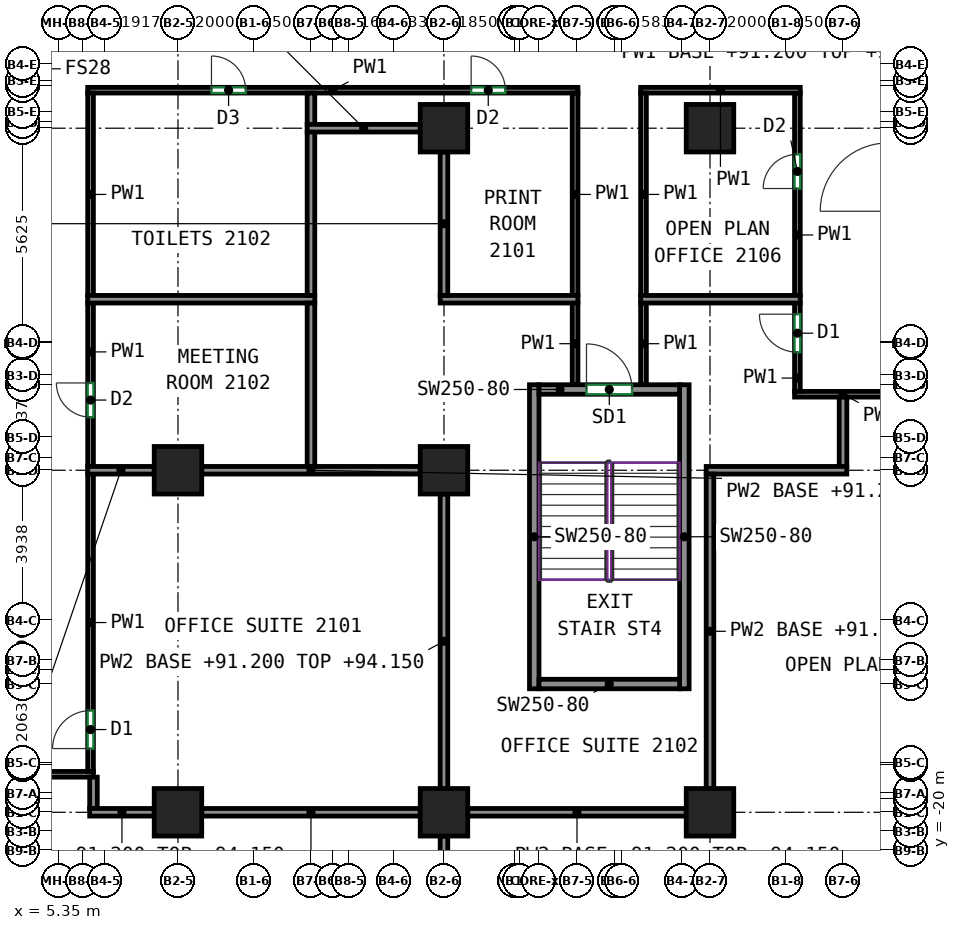
"""IFC4 building model, lengths in metres.
Left out: names, types, materials, properties, quantities, classifications, styles, units other than length and angle.
Written with IfcOpenShell. Run it as: python <this file> out.ifc"""

import sys

from ifc_helpers import new_model, si_unit, direction, frame, frame_2d, origin, origin_2d, place, context, subcontext, project, spatial, rectangle, extrude, source, transform, mapped, element, fill, save


model = new_model("IFC4")
c1 = context("Model", 3, precision=1e-05, world=origin(), true_north=direction((0.0, 1.0)))
c2 = subcontext(c1, "Body", "Model", "MODEL_VIEW")
j1 = project(units=[si_unit("LENGTHUNIT", "METRE"), si_unit("PLANEANGLEUNIT", "RADIAN")], contexts=[c1])
p1 = place(None, origin())
s1 = spatial("IfcSite", under=j1, at=p1, CompositionType="ELEMENT")
p2 = place(p1, origin())
s2 = spatial("IfcBuilding", under=s1, at=p2, CompositionType="ELEMENT")
p3 = place(p2, frame((0.0, 0.0, 91.2)))
s3 = spatial("IfcBuildingStorey", under=s2, at=p3, CompositionType="ELEMENT", Elevation=91.2)
m1 = source(origin(), c2, "Body", "SweptSolid", [
    extrude(rectangle(XDim=1.25, YDim=1.25, at=origin_2d()), origin(), (0.0, 0.0, 1.0), 3.6),
])
for number, where, z_axis, x_axis in (
    (1, (8.5, -19.0, 0.0), (0.0, 0.0, 1.0), (1.0, 0.0, 0.0)),
    (2, (8.5, -10.0, 0.0), (0.0, 0.0, 1.0), (1.0, 0.0, 0.0)),
    (3, (15.5, -19.0, 0.0), (0.0, 0.0, 1.0), (1.0, 0.0, 0.0)),
    (4, (15.5, -10.0, 0.0), (0.0, 0.0, 1.0), (1.0, 0.0, 0.0)),
    (5, (15.5, -1.0, 0.0), (0.0, 0.0, 1.0), (1.0, 0.0, 0.0)),
    (6, (22.5, -19.0, 0.0), (0.0, 0.0, 1.0), (1.0, 0.0, 0.0)),
    (7, (22.5, -1.0, 0.0), (0.0, 0.0, 1.0), (1.0, 0.0, 0.0)),
):
    element("IfcColumn", number, at=place(p3, frame(where, z_axis=z_axis, x_axis=x_axis)), inside=s3, PredefinedType="COLUMN", context=c2, shape_type="MappedRepresentation", body=[
        mapped(m1, transform((0.0, 0.0, 0.0))),
    ])
m2 = source(origin(), c2, "Body", "SweptSolid", [
    extrude(rectangle(XDim=8.0, YDim=0.25, at=frame_2d((4.0, 0.0))), origin(), (0.0, 0.0, 1.0), 3.6),
])
for number, where, z_axis, x_axis in (
    (8, (17.875, -15.75, 0.0), (0.0, 0.0, 1.0), (0.0, 1.0, 0.0)),
    (9, (21.825, -15.75, 0.0), (0.0, 0.0, 1.0), (0.0, 1.0, 0.0)),
):
    element("IfcWall", number, at=place(p3, frame(where, z_axis=z_axis, x_axis=x_axis)), inside=s3, PredefinedType="SHEAR", context=c2, shape_type="MappedRepresentation", body=[
        mapped(m2, transform((0.0, 0.0, 0.0))),
    ])
m3 = source(origin(), c2, "Body", "SweptSolid", [
    extrude(rectangle(XDim=3.7, YDim=0.25, at=frame_2d((1.85, 0.0))), origin(), (0.0, 0.0, 1.0), 3.6),
])
p4 = place(p3, frame((18.0, -15.625, 0.0), z_axis=(0.0, 0.0, 1.0), x_axis=(1.0, 0.0, 0.0)))
e10 = element("IfcWall", 10, at=p4, inside=s3, PredefinedType="SHEAR", context=c2, shape_type="MappedRepresentation", body=[
    mapped(m3, transform((0.0, 0.0, 0.0))),
])
p5 = place(p3, frame((18.0, -7.875, 0.0), z_axis=(0.0, 0.0, 1.0), x_axis=(1.0, 0.0, 0.0)))
e11 = element("IfcWall", 11, at=p5, inside=s3, PredefinedType="SHEAR", context=c2, shape_type="MappedRepresentation", body=[
    mapped(m3, transform((0.0, 0.0, 0.0))),
])
p6 = place(p5, frame((1.25, 0.0, 0.0)))
e12 = element("IfcOpeningElement", 12, at=p6, cuts=e11, PredefinedType="OPENING", context=c2, shape_type="SweptSolid", body=[
    extrude(rectangle(XDim=1.2, YDim=2.1, at=frame_2d((0.6, 1.05))), frame((0.0, 0.135, 0.0), z_axis=(0.0, -1.0, 0.0), x_axis=(1.0, 0.0, 0.0)), (0.0, 0.0, 1.0), 0.27),
])
p7 = place(p3, frame((3.802, -18.0, 0.0), z_axis=(0.0, 0.0, 1.0), x_axis=(1.0, 0.0, 0.0)))
e13 = element("IfcWall", 13, at=p7, inside=s3, PredefinedType="PARTITIONING", context=c2, shape_type="SweptSolid", body=[
    extrude(rectangle(XDim=2.473, YDim=0.15, at=frame_2d((1.236, 0.0))), origin(), (0.0, 0.0, 1.0), 3.6),
])
p8 = place(p3, frame((6.2, -17.925, 0.0), z_axis=(0.0, 0.0, 1.0), x_axis=(0.0, 1.0, 0.0)))
e14 = element("IfcWall", 14, at=p8, inside=s3, PredefinedType="PARTITIONING", context=c2, shape_type="SweptSolid", body=[
    extrude(rectangle(XDim=7.835, YDim=0.15, at=frame_2d((3.917, 0.0))), origin(), (0.0, 0.0, 1.0), 3.6),
])
p9 = place(p8, frame((0.602, 0.0, 0.0)))
e15 = element("IfcOpeningElement", 15, at=p9, cuts=e14, PredefinedType="OPENING", context=c2, shape_type="SweptSolid", body=[
    extrude(rectangle(XDim=1.0, YDim=2.1, at=frame_2d((0.5, 1.05))), frame((0.0, 0.085, 0.0), z_axis=(0.0, -1.0, 0.0), x_axis=(1.0, 0.0, 0.0)), (0.0, 0.0, 1.0), 0.17),
])
p10 = place(p3, frame((6.2, -9.91, 0.0), z_axis=(0.0, 0.0, 1.0), x_axis=(0.0, 1.0, 0.0)))
e16 = element("IfcWall", 16, at=p10, inside=s3, PredefinedType="PARTITIONING", context=c2, shape_type="SweptSolid", body=[
    extrude(rectangle(XDim=4.32, YDim=0.15, at=frame_2d((2.16, 0.0))), origin(), (0.0, 0.0, 1.0), 3.6),
])
p11 = place(p10, frame((1.307, 0.0, 0.0)))
e17 = element("IfcOpeningElement", 17, at=p11, cuts=e16, PredefinedType="OPENING", context=c2, shape_type="SweptSolid", body=[
    extrude(rectangle(XDim=0.9, YDim=2.1, at=frame_2d((0.45, 1.05))), frame((0.0, 0.085, 0.0), z_axis=(0.0, -1.0, 0.0), x_axis=(1.0, 0.0, 0.0)), (0.0, 0.0, 1.0), 0.17),
])
p12 = place(p3, frame((6.125, 0.0, 0.0), z_axis=(0.0, 0.0, 1.0), x_axis=(1.0, 0.0, 0.0)))
e18 = element("IfcWall", 18, at=p12, inside=s3, PredefinedType="PARTITIONING", context=c2, shape_type="SweptSolid", body=[
    extrude(rectangle(XDim=12.9, YDim=0.15, at=frame_2d((6.45, 0.0))), origin(), (0.0, 0.0, 1.0), 3.6),
])
p13 = place(p12, frame((3.257, 0.0, 0.0)))
e19 = element("IfcOpeningElement", 19, at=p13, cuts=e18, PredefinedType="OPENING", context=c2, shape_type="SweptSolid", body=[
    extrude(rectangle(XDim=0.9, YDim=2.1, at=frame_2d((0.45, 1.05))), frame((0.0, 0.085, 0.0), z_axis=(0.0, -1.0, 0.0), x_axis=(1.0, 0.0, 0.0)), (0.0, 0.0, 1.0), 0.17),
])
p14 = place(p12, frame((10.09, 0.0, 0.0)))
e20 = element("IfcOpeningElement", 20, at=p14, cuts=e18, PredefinedType="OPENING", context=c2, shape_type="SweptSolid", body=[
    extrude(rectangle(XDim=0.9, YDim=2.1, at=frame_2d((0.45, 1.05))), frame((0.0, 0.085, 0.0), z_axis=(0.0, -1.0, 0.0), x_axis=(1.0, 0.0, 0.0)), (0.0, 0.0, 1.0), 0.17),
])
for number, where, z_axis, x_axis in (
    (21, (6.2, -5.41, 0.0), (0.0, 0.0, 1.0), (0.0, 1.0, 0.0)),
    (22, (18.95, -5.41, 0.0), (0.0, 0.0, 1.0), (0.0, 1.0, 0.0)),
):
    element("IfcWall", number, at=place(p3, frame(where, z_axis=z_axis, x_axis=x_axis)), inside=s3, PredefinedType="PARTITIONING", context=c2, shape_type="SweptSolid", body=[
        extrude(rectangle(XDim=5.335, YDim=0.15, at=frame_2d((2.667, 0.0))), origin(), (0.0, 0.0, 1.0), 3.6),
    ])
p15 = place(p3, frame((24.725, -8.0, 0.0), z_axis=(0.0, 0.0, 1.0), x_axis=(1.0, 0.0, 0.0)))
e23 = element("IfcWall", 23, at=p15, inside=s3, PredefinedType="PARTITIONING", context=c2, shape_type="SweptSolid", body=[
    extrude(rectangle(XDim=2.55, YDim=0.15, at=frame_2d((1.275, 0.0))), origin(), (0.0, 0.0, 1.0), 3.6),
])
p16 = place(p3, frame((24.8, -7.925, 0.0), z_axis=(0.0, 0.0, 1.0), x_axis=(0.0, 1.0, 0.0)))
e24 = element("IfcWall", 24, at=p16, inside=s3, PredefinedType="PARTITIONING", context=c2, shape_type="SweptSolid", body=[
    extrude(rectangle(XDim=2.335, YDim=0.15, at=frame_2d((1.167, 0.0))), origin(), (0.0, 0.0, 1.0), 3.6),
])
p17 = place(p16, frame((1.031, 0.0, 0.0)))
e25 = element("IfcOpeningElement", 25, at=p17, cuts=e24, PredefinedType="OPENING", context=c2, shape_type="SweptSolid", body=[
    extrude(rectangle(XDim=1.0, YDim=2.1, at=frame_2d((0.5, 1.05))), frame((0.0, 0.085, 0.0), z_axis=(0.0, -1.0, 0.0), x_axis=(1.0, 0.0, 0.0)), (0.0, 0.0, 1.0), 0.17),
])
for number, where, z_axis, x_axis in (
    (26, (20.75, -7.75, 0.0), (0.0, 0.0, 1.0), (0.0, 1.0, 0.0)),
    (27, (18.95, -7.75, 0.0), (0.0, 0.0, 1.0), (0.0, 1.0, 0.0)),
):
    element("IfcWall", number, at=place(p3, frame(where, z_axis=z_axis, x_axis=x_axis)), inside=s3, PredefinedType="PARTITIONING", context=c2, shape_type="SweptSolid", body=[
        extrude(rectangle(XDim=2.16, YDim=0.15, at=frame_2d((1.08, 0.0))), origin(), (0.0, 0.0, 1.0), 3.6),
    ])
p18 = place(p3, frame((24.8, -5.41, 0.0), z_axis=(0.0, 0.0, 1.0), x_axis=(0.0, 1.0, 0.0)))
e28 = element("IfcWall", 28, at=p18, inside=s3, PredefinedType="PARTITIONING", context=c2, shape_type="SweptSolid", body=[
    extrude(rectangle(XDim=5.335, YDim=0.15, at=frame_2d((2.667, 0.0))), origin(), (0.0, 0.0, 1.0), 3.6),
])
p19 = place(p18, frame((2.823, 0.0, 0.0)))
e29 = element("IfcOpeningElement", 29, at=p19, cuts=e28, PredefinedType="OPENING", context=c2, shape_type="SweptSolid", body=[
    extrude(rectangle(XDim=0.9, YDim=2.1, at=frame_2d((0.45, 1.05))), frame((0.0, 0.085, 0.0), z_axis=(0.0, -1.0, 0.0), x_axis=(1.0, 0.0, 0.0)), (0.0, 0.0, 1.0), 0.17),
])
p20 = place(p3, frame((20.675, 0.0, 0.0), z_axis=(0.0, 0.0, 1.0), x_axis=(1.0, 0.0, 0.0)))
e30 = element("IfcWall", 30, at=p20, inside=s3, PredefinedType="PARTITIONING", context=c2, shape_type="SweptSolid", body=[
    extrude(rectangle(XDim=4.2, YDim=0.15, at=frame_2d((2.1, 0.0))), origin(), (0.0, 0.0, 1.0), 3.6),
])
p21 = place(p3, frame((20.75, -5.41, 0.0), z_axis=(0.0, 0.0, 1.0), x_axis=(0.0, 1.0, 0.0)))
e31 = element("IfcWall", 31, at=p21, inside=s3, PredefinedType="PARTITIONING", context=c2, shape_type="SweptSolid", body=[
    extrude(rectangle(XDim=5.335, YDim=0.15, at=frame_2d((2.667, 0.0))), origin(), (0.0, 0.0, 1.0), 3.6),
])
p22 = place(p3, frame((6.277, -18.9, 0.0), z_axis=(0.0, 0.0, 1.0), x_axis=(0.0, 1.0, 0.0)))
e32 = element("IfcWall", 32, at=p22, inside=s3, PredefinedType="PARTITIONING", context=c2, shape_type="SweptSolid", body=[
    extrude(rectangle(XDim=0.825, YDim=0.2, at=frame_2d((0.413, 0.0))), origin(), (0.0, 0.0, 1.0), 3.6),
])
p23 = place(p3, frame((6.177, -19.0, 0.0), z_axis=(0.0, 0.0, 1.0), x_axis=(1.0, 0.0, 0.0)))
e33 = element("IfcWall", 33, at=p23, inside=s3, PredefinedType="PARTITIONING", context=c2, shape_type="SweptSolid", body=[
    extrude(rectangle(XDim=1.698, YDim=0.2, at=frame_2d((0.849, 0.0))), origin(), (0.0, 0.0, 1.0), 2.95),
])
p24 = place(p3, frame((9.125, -19.0, 0.0), z_axis=(0.0, 0.0, 1.0), x_axis=(1.0, 0.0, 0.0)))
e34 = element("IfcWall", 34, at=p24, inside=s3, PredefinedType="PARTITIONING", context=c2, shape_type="SweptSolid", body=[
    extrude(rectangle(XDim=5.75, YDim=0.2, at=frame_2d((2.875, 0.0))), origin(), (0.0, 0.0, 1.0), 2.95),
])
p25 = place(p3, frame((15.5, -27.1, 0.0), z_axis=(0.0, 0.0, 1.0), x_axis=(0.0, 1.0, 0.0)))
e35 = element("IfcWall", 35, at=p25, inside=s3, PredefinedType="PARTITIONING", context=c2, shape_type="SweptSolid", body=[
    extrude(rectangle(XDim=7.475, YDim=0.2, at=frame_2d((3.738, 0.0))), origin(), (0.0, 0.0, 1.0), 2.95),
])
p26 = place(p3, frame((9.125, -10.0, 0.0), z_axis=(0.0, 0.0, 1.0), x_axis=(1.0, 0.0, 0.0)))
e36 = element("IfcWall", 36, at=p26, inside=s3, PredefinedType="PARTITIONING", context=c2, shape_type="SweptSolid", body=[
    extrude(rectangle(XDim=5.75, YDim=0.2, at=frame_2d((2.875, 0.0))), origin(), (0.0, 0.0, 1.0), 2.95),
])
p27 = place(p3, frame((6.126, -10.0, 0.0), z_axis=(0.0, 0.0, 1.0), x_axis=(1.0, 0.0, 0.0)))
e37 = element("IfcWall", 37, at=p27, inside=s3, PredefinedType="PARTITIONING", context=c2, shape_type="SweptSolid", body=[
    extrude(rectangle(XDim=1.749, YDim=0.2, at=frame_2d((0.875, 0.0))), origin(), (0.0, 0.0, 1.0), 2.95),
])
p28 = place(p3, frame((15.5, -18.375, 0.0), z_axis=(0.0, 0.0, 1.0), x_axis=(0.0, 1.0, 0.0)))
e38 = element("IfcWall", 38, at=p28, inside=s3, PredefinedType="PARTITIONING", context=c2, shape_type="SweptSolid", body=[
    extrude(rectangle(XDim=7.75, YDim=0.2, at=frame_2d((3.875, 0.0))), origin(), (0.0, 0.0, 1.0), 2.95),
])
p29 = place(p3, frame((6.126, -5.5, 0.0), z_axis=(0.0, 0.0, 1.0), x_axis=(1.0, 0.0, 0.0)))
e39 = element("IfcWall", 39, at=p29, inside=s3, PredefinedType="PARTITIONING", context=c2, shape_type="SweptSolid", body=[
    extrude(rectangle(XDim=5.974, YDim=0.2, at=frame_2d((2.987, 0.0))), origin(), (0.0, 0.0, 1.0), 3.6),
])
p30 = place(p3, frame((12.0, -9.9, 0.0), z_axis=(0.0, 0.0, 1.0), x_axis=(0.0, 1.0, 0.0)))
e40 = element("IfcWall", 40, at=p30, inside=s3, PredefinedType="PARTITIONING", context=c2, shape_type="SweptSolid", body=[
    extrude(rectangle(XDim=4.3, YDim=0.2, at=frame_2d((2.15, 0.0))), origin(), (0.0, 0.0, 1.0), 3.6),
])
p31 = place(p3, frame((12.0, -0.91, 0.0), z_axis=(0.0, 0.0, 1.0), x_axis=(0.0, 1.0, 0.0)))
e41 = element("IfcWall", 41, at=p31, inside=s3, PredefinedType="PARTITIONING", context=c2, shape_type="SweptSolid", body=[
    extrude(rectangle(XDim=0.834, YDim=0.2, at=frame_2d((0.417, 0.0))), origin(), (0.0, 0.0, 1.0), 3.6),
])
p32 = place(p3, frame((12.0, -5.4, 0.0), z_axis=(0.0, 0.0, 1.0), x_axis=(0.0, 1.0, 0.0)))
e42 = element("IfcWall", 42, at=p32, inside=s3, PredefinedType="PARTITIONING", context=c2, shape_type="SweptSolid", body=[
    extrude(rectangle(XDim=4.31, YDim=0.2, at=frame_2d((2.155, 0.0))), origin(), (0.0, 0.0, 1.0), 3.6),
])
p33 = place(p3, frame((15.4, -5.5, 0.0), z_axis=(0.0, 0.0, 1.0), x_axis=(1.0, 0.0, 0.0)))
e43 = element("IfcWall", 43, at=p33, inside=s3, PredefinedType="PARTITIONING", context=c2, shape_type="SweptSolid", body=[
    extrude(rectangle(XDim=3.624, YDim=0.2, at=frame_2d((1.812, 0.0))), origin(), (0.0, 0.0, 1.0), 3.6),
])
p34 = place(p3, frame((15.5, -5.4, 0.0), z_axis=(0.0, 0.0, 1.0), x_axis=(0.0, 1.0, 0.0)))
e44 = element("IfcWall", 44, at=p34, inside=s3, PredefinedType="PARTITIONING", context=c2, shape_type="SweptSolid", body=[
    extrude(rectangle(XDim=3.775, YDim=0.2, at=frame_2d((1.887, 0.0))), origin(), (0.0, 0.0, 1.0), 2.95),
])
p35 = place(p3, frame((11.9, -1.0, 0.0), z_axis=(0.0, 0.0, 1.0), x_axis=(1.0, 0.0, 0.0)))
e45 = element("IfcWall", 45, at=p35, inside=s3, PredefinedType="PARTITIONING", context=c2, shape_type="SweptSolid", body=[
    extrude(rectangle(XDim=2.975, YDim=0.2, at=frame_2d((1.488, 0.0))), origin(), (0.0, 0.0, 1.0), 2.95),
])
p36 = place(p3, frame((20.676, -5.5, 0.0), z_axis=(0.0, 0.0, 1.0), x_axis=(1.0, 0.0, 0.0)))
e46 = element("IfcWall", 46, at=p36, inside=s3, PredefinedType="PARTITIONING", context=c2, shape_type="SweptSolid", body=[
    extrude(rectangle(XDim=4.198, YDim=0.2, at=frame_2d((2.099, 0.0))), origin(), (0.0, 0.0, 1.0), 3.6),
])
p37 = place(p3, frame((26.0, -9.9, 0.0), z_axis=(0.0, 0.0, 1.0), x_axis=(0.0, 1.0, 0.0)))
e47 = element("IfcWall", 47, at=p37, inside=s3, PredefinedType="PARTITIONING", context=c2, shape_type="SweptSolid", body=[
    extrude(rectangle(XDim=1.824, YDim=0.2, at=frame_2d((0.912, 0.0))), origin(), (0.0, 0.0, 1.0), 3.6),
])
p38 = place(p3, frame((22.4, -10.0, 0.0), z_axis=(0.0, 0.0, 1.0), x_axis=(1.0, 0.0, 0.0)))
e48 = element("IfcWall", 48, at=p38, inside=s3, PredefinedType="PARTITIONING", context=c2, shape_type="SweptSolid", body=[
    extrude(rectangle(XDim=3.7, YDim=0.2, at=frame_2d((1.85, 0.0))), origin(), (0.0, 0.0, 1.0), 3.6),
])
p39 = place(p3, frame((22.5, -18.375, 0.0), z_axis=(0.0, 0.0, 1.0), x_axis=(0.0, 1.0, 0.0)))
e49 = element("IfcWall", 49, at=p39, inside=s3, PredefinedType="PARTITIONING", context=c2, shape_type="SweptSolid", body=[
    extrude(rectangle(XDim=8.275, YDim=0.2, at=frame_2d((4.137, 0.0))), origin(), (0.0, 0.0, 1.0), 2.95),
])
p40 = place(p3, frame((16.125, -19.0, 0.0), z_axis=(0.0, 0.0, 1.0), x_axis=(1.0, 0.0, 0.0)))
e50 = element("IfcWall", 50, at=p40, inside=s3, PredefinedType="PARTITIONING", context=c2, shape_type="SweptSolid", body=[
    extrude(rectangle(XDim=5.75, YDim=0.2, at=frame_2d((2.875, 0.0))), origin(), (0.0, 0.0, 1.0), 2.95),
])
p41 = place(p6, origin())
e51 = element("IfcDoor", 51, at=p41, inside=s3, OperationType="DOUBLE_DOOR_SINGLE_SWING", PredefinedType="DOOR", context=c2, shape_type="SweptSolid", body=[
    extrude(rectangle(XDim=1.2, YDim=2.1, at=frame_2d((0.6, 1.05))), frame((0.0, 0.025, 0.0), z_axis=(0.0, -1.0, 0.0), x_axis=(1.0, 0.0, 0.0)), (0.0, 0.0, 1.0), 0.05),
])
fill(e12, e51)
p42 = place(p9, origin())
e52 = element("IfcDoor", 52, at=p42, inside=s3, OperationType="SINGLE_SWING_LEFT", PredefinedType="DOOR", context=c2, shape_type="SweptSolid", body=[
    extrude(rectangle(XDim=1.0, YDim=2.1, at=frame_2d((0.5, 1.05))), frame((0.0, 0.025, 0.0), z_axis=(0.0, -1.0, 0.0), x_axis=(1.0, 0.0, 0.0)), (0.0, 0.0, 1.0), 0.05),
])
fill(e15, e52)
p43 = place(p11, origin())
e53 = element("IfcDoor", 53, at=p43, inside=s3, OperationType="SINGLE_SWING_RIGHT", PredefinedType="DOOR", context=c2, shape_type="SweptSolid", body=[
    extrude(rectangle(XDim=0.9, YDim=2.1, at=frame_2d((0.45, 1.05))), frame((0.0, 0.025, 0.0), z_axis=(0.0, -1.0, 0.0), x_axis=(1.0, 0.0, 0.0)), (0.0, 0.0, 1.0), 0.05),
])
fill(e17, e53)
p44 = place(p17, origin())
e54 = element("IfcDoor", 54, at=p44, inside=s3, OperationType="SINGLE_SWING_RIGHT", PredefinedType="DOOR", context=c2, shape_type="SweptSolid", body=[
    extrude(rectangle(XDim=1.0, YDim=2.1, at=frame_2d((0.5, 1.05))), frame((0.0, 0.025, 0.0), z_axis=(0.0, -1.0, 0.0), x_axis=(1.0, 0.0, 0.0)), (0.0, 0.0, 1.0), 0.05),
])
fill(e25, e54)
p45 = place(p19, origin())
e55 = element("IfcDoor", 55, at=p45, inside=s3, OperationType="SINGLE_SWING_LEFT", PredefinedType="DOOR", context=c2, shape_type="SweptSolid", body=[
    extrude(rectangle(XDim=0.9, YDim=2.1, at=frame_2d((0.45, 1.05))), frame((0.0, 0.025, 0.0), z_axis=(0.0, -1.0, 0.0), x_axis=(1.0, 0.0, 0.0)), (0.0, 0.0, 1.0), 0.05),
])
fill(e29, e55)
p46 = place(p13, origin())
e56 = element("IfcDoor", 56, at=p46, inside=s3, OperationType="SINGLE_SWING_LEFT", PredefinedType="DOOR", context=c2, shape_type="SweptSolid", body=[
    extrude(rectangle(XDim=0.9, YDim=2.1, at=frame_2d((0.45, 1.05))), frame((0.0, 0.025, 0.0), z_axis=(0.0, -1.0, 0.0), x_axis=(1.0, 0.0, 0.0)), (0.0, 0.0, 1.0), 0.05),
])
fill(e19, e56)
p47 = place(p14, origin())
e57 = element("IfcDoor", 57, at=p47, inside=s3, OperationType="SINGLE_SWING_LEFT", PredefinedType="DOOR", context=c2, shape_type="SweptSolid", body=[
    extrude(rectangle(XDim=0.9, YDim=2.1, at=frame_2d((0.45, 1.05))), frame((0.0, 0.025, 0.0), z_axis=(0.0, -1.0, 0.0), x_axis=(1.0, 0.0, 0.0)), (0.0, 0.0, 1.0), 0.05),
])
fill(e20, e57)
save(model, sys.argv[1])
